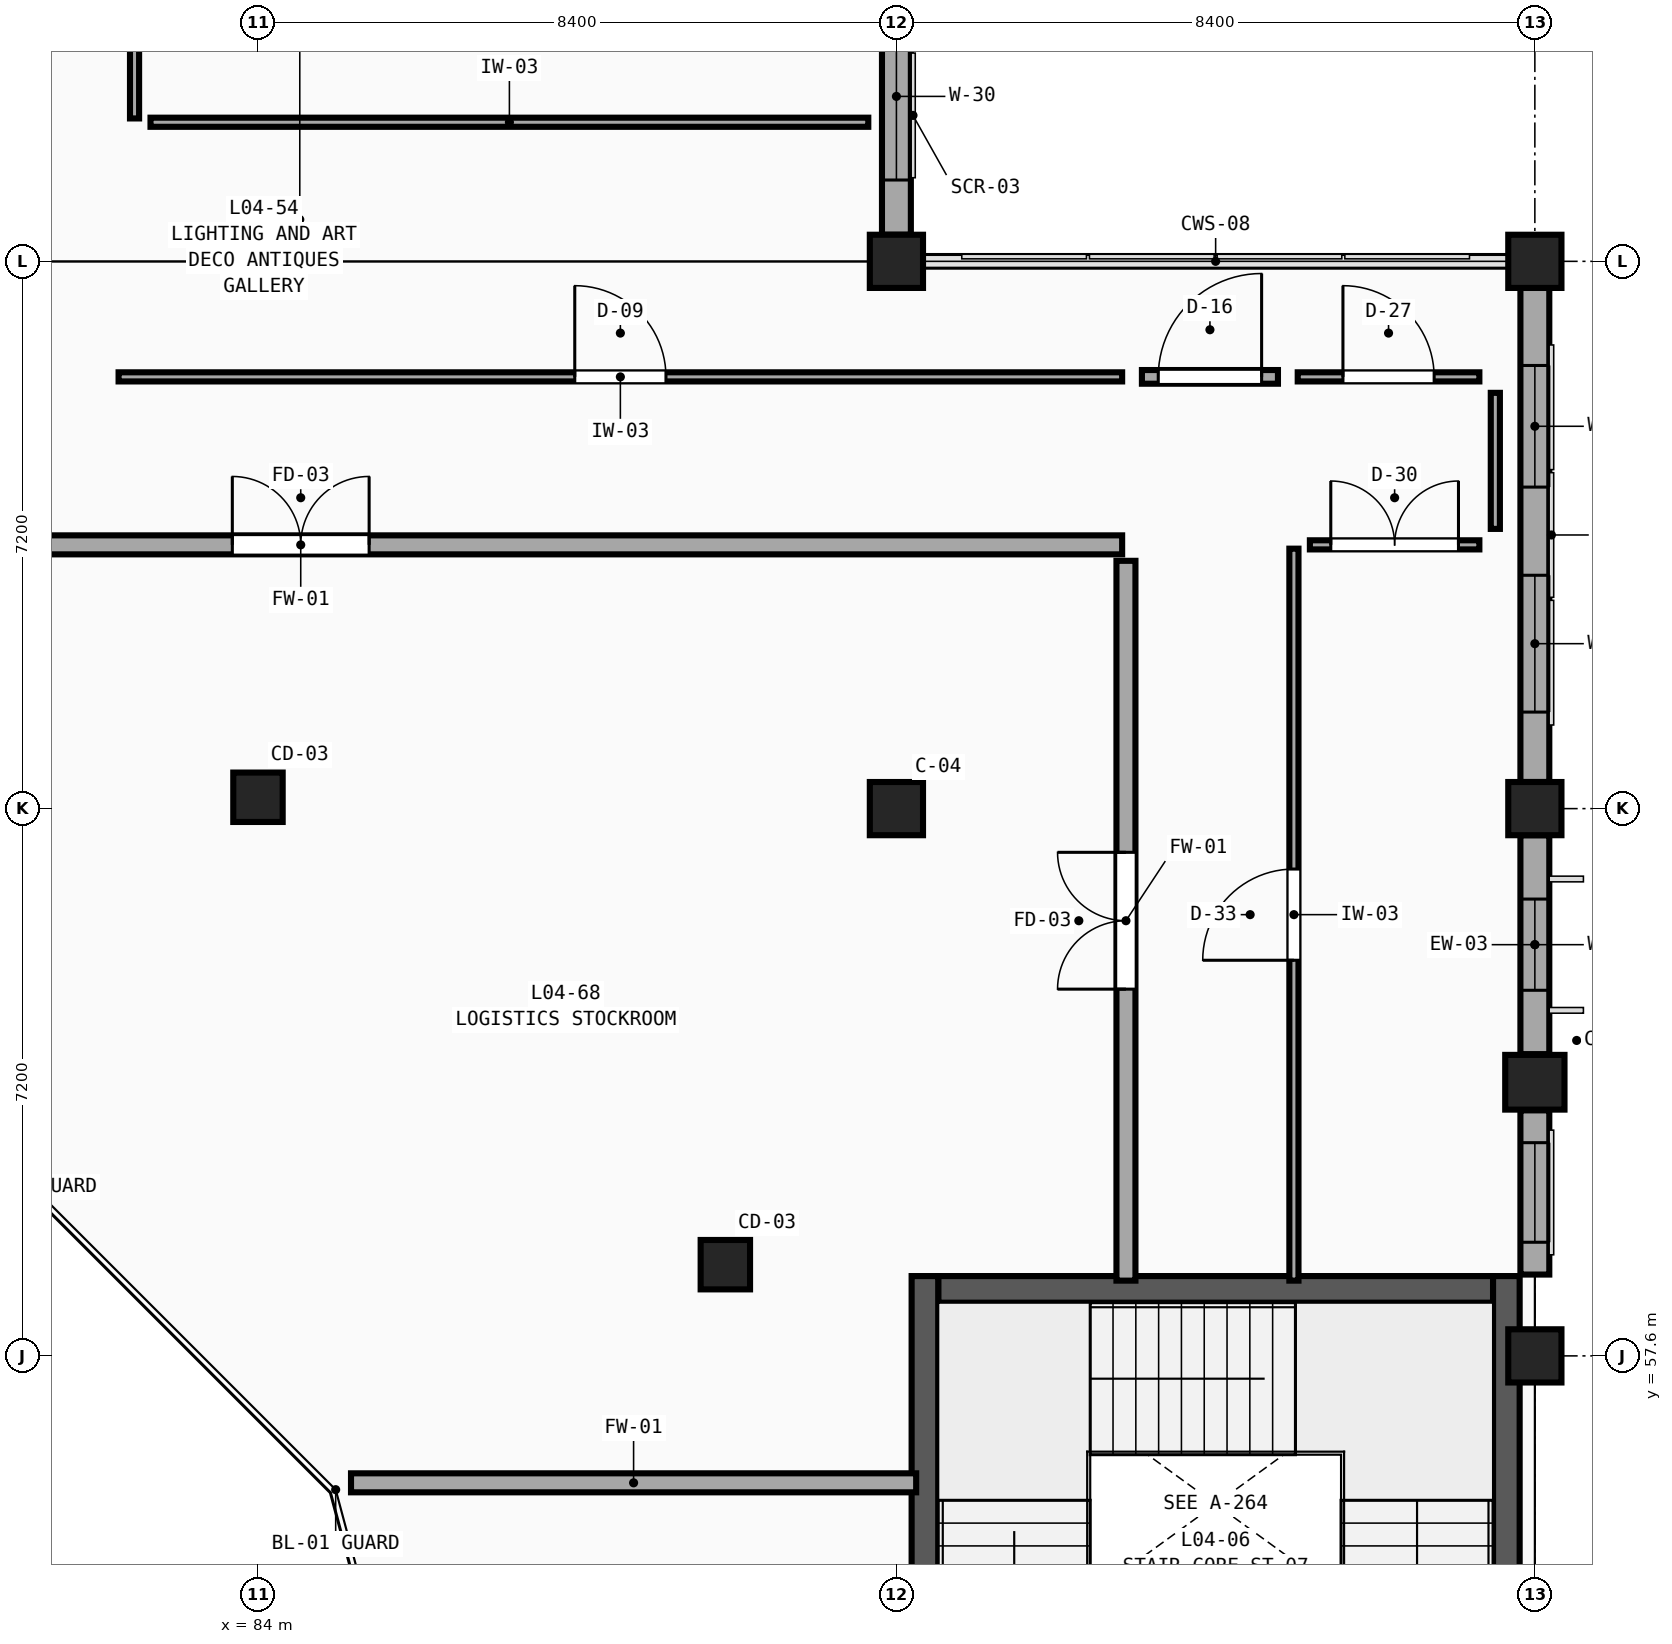
"""IFC4 building model, lengths in metres.
Left out: names, types, materials, properties, quantities, classifications, styles, units other than length and angle.
Written with IfcOpenShell. Run it as: python <this file> out.ifc"""

import sys

from ifc_helpers import new_model, si_unit, direction, frame, frame_2d, origin, origin_2d, place, context, subcontext, project, spatial, rectangle, circle, extrude, element, fill, save


model = new_model("IFC4")
c1 = context("Model", 3, precision=1e-05, world=origin(), true_north=direction((0.0, 1.0)))
c2 = subcontext(c1, "Body", "Model", "MODEL_VIEW")
j1 = project(units=[si_unit("LENGTHUNIT", "METRE"), si_unit("PLANEANGLEUNIT", "RADIAN")], contexts=[c1])
p1 = place(None, origin())
s1 = spatial("IfcSite", under=j1, at=p1, CompositionType="ELEMENT")
p2 = place(p1, origin())
s2 = spatial("IfcBuilding", under=s1, at=p2, CompositionType="ELEMENT")
p3 = place(p2, frame((0.0, 0.0, 18.9)))
s3 = spatial("IfcBuildingStorey", under=s2, at=p3, CompositionType="ELEMENT", Elevation=18.9)
for number, where, z_axis, x_axis in (
    (1, (84.0, 72.0, 0.0), (0.0, 0.0, 1.0), (1.0, 0.0, 0.0)),
    (2, (92.4, 64.8, 0.0), (0.0, 0.0, 1.0), (1.0, 0.0, 0.0)),
    (3, (92.4, 72.0, 0.0), (0.0, 0.0, 1.0), (1.0, 0.0, 0.0)),
    (4, (100.8, 57.6, 0.0), (0.0, 0.0, 1.0), (1.0, 0.0, 0.0)),
    (5, (100.8, 64.8, 0.0), (0.0, 0.0, 1.0), (1.0, 0.0, 0.0)),
    (6, (100.8, 72.0, 0.0), (0.0, 0.0, 1.0), (1.0, 0.0, 0.0)),
):
    element("IfcColumn", number, at=place(p3, frame(where, z_axis=z_axis, x_axis=x_axis)), inside=s3, PredefinedType="COLUMN", context=c2, shape_type="SweptSolid", body=[
        extrude(rectangle(XDim=0.7, YDim=0.7, at=origin_2d()), origin(), (0.0, 0.0, 1.0), 4.5),
    ])
p4 = place(p3, frame((100.8, 61.2, 0.0), z_axis=(0.0, 0.0, 1.0), x_axis=(1.0, 0.0, 0.0)))
e7 = element("IfcColumn", 7, at=p4, inside=s3, PredefinedType="PILASTER", context=c2, shape_type="SweptSolid", body=[
    extrude(rectangle(XDim=0.78, YDim=0.72, at=origin_2d()), origin(), (0.0, 0.0, 1.0), 4.5),
])
for number, where, z_axis, x_axis in (
    (8, (90.149, 58.8, 0.0), (0.0, 0.0, 1.0), (1.0, 0.0, 0.0)),
    (9, (84.0, 64.949, 0.0), (0.0, 0.0, 1.0), (1.0, 0.0, 0.0)),
):
    element("IfcColumn", number, at=place(p3, frame(where, z_axis=z_axis, x_axis=x_axis)), inside=s3, PredefinedType="COLUMN", context=c2, shape_type="SweptSolid", body=[
        extrude(circle(Radius=0.325, at=origin_2d()), origin(), (0.0, 0.0, 1.0), 4.5),
    ])
p5 = place(p3, frame((92.4, 78.85, 0.0), z_axis=(0.0, 0.0, 1.0), x_axis=(0.0, -1.0, 0.0)))
e10 = element("IfcWall", 10, at=p5, inside=s3, PredefinedType="SOLIDWALL", context=c2, shape_type="SweptSolid", body=[
    extrude(rectangle(XDim=6.5, YDim=0.38, at=frame_2d((3.25, 0.0))), origin(), (0.0, 0.0, 1.0), 3.63),
])
p6 = place(p5, frame((0.82, 0.0, 0.75)))
e11 = element("IfcOpeningElement", 11, at=p6, cuts=e10, PredefinedType="OPENING", context=c2, shape_type="SweptSolid", body=[
    extrude(rectangle(XDim=2.0, YDim=2.44, at=frame_2d((1.0, 1.22))), frame((0.0, 0.21, 0.0), z_axis=(0.0, -1.0, 0.0), x_axis=(1.0, 0.0, 0.0)), (0.0, 0.0, 1.0), 0.42),
])
p7 = place(p5, frame((3.58, 0.0, 0.75)))
e12 = element("IfcOpeningElement", 12, at=p7, cuts=e10, PredefinedType="OPENING", context=c2, shape_type="SweptSolid", body=[
    extrude(rectangle(XDim=2.2, YDim=2.44, at=frame_2d((1.1, 1.22))), frame((0.0, 0.21, 0.0), z_axis=(0.0, -1.0, 0.0), x_axis=(1.0, 0.0, 0.0)), (0.0, 0.0, 1.0), 0.42),
])
p8 = place(p3, frame((100.8, 64.45, 0.0), z_axis=(0.0, 0.0, 1.0), x_axis=(0.0, -1.0, 0.0)))
e13 = element("IfcWall", 13, at=p8, inside=s3, PredefinedType="SOLIDWALL", context=c2, shape_type="SweptSolid", body=[
    extrude(rectangle(XDim=2.88, YDim=0.38, at=frame_2d((1.44, 0.0))), origin(), (0.0, 0.0, 1.0), 3.63),
])
p9 = place(p8, frame((0.84, 0.0, 0.75)))
e14 = element("IfcOpeningElement", 14, at=p9, cuts=e13, PredefinedType="OPENING", context=c2, shape_type="SweptSolid", body=[
    extrude(rectangle(XDim=1.2, YDim=2.73, at=frame_2d((0.6, 1.365))), frame((0.0, 0.21, 0.0), z_axis=(0.0, -1.0, 0.0), x_axis=(1.0, 0.0, 0.0)), (0.0, 0.0, 1.0), 0.42),
])
p10 = place(p3, frame((100.8, 60.83, 0.0), z_axis=(0.0, 0.0, 1.0), x_axis=(0.0, -1.0, 0.0)))
e15 = element("IfcWall", 15, at=p10, inside=s3, PredefinedType="SOLIDWALL", context=c2, shape_type="SweptSolid", body=[
    extrude(rectangle(XDim=2.16, YDim=0.38, at=frame_2d((1.08, 0.0))), origin(), (0.0, 0.0, 1.0), 3.63),
])
p11 = place(p10, frame((0.425, 0.0, 0.75)))
e16 = element("IfcOpeningElement", 16, at=p11, cuts=e15, PredefinedType="OPENING", context=c2, shape_type="SweptSolid", body=[
    extrude(rectangle(XDim=1.31, YDim=2.73, at=frame_2d((0.655, 1.365))), frame((0.0, 0.21, 0.0), z_axis=(0.0, -1.0, 0.0), x_axis=(1.0, 0.0, 0.0)), (0.0, 0.0, 1.0), 0.42),
])
p12 = place(p3, frame((100.8, 71.65, 0.0), z_axis=(0.0, 0.0, 1.0), x_axis=(0.0, -1.0, 0.0)))
e17 = element("IfcWall", 17, at=p12, inside=s3, PredefinedType="SOLIDWALL", context=c2, shape_type="SweptSolid", body=[
    extrude(rectangle(XDim=6.5, YDim=0.38, at=frame_2d((3.25, 0.0))), origin(), (0.0, 0.0, 1.0), 3.63),
])
p13 = place(p12, frame((1.02, 0.0, 0.75)))
e18 = element("IfcOpeningElement", 18, at=p13, cuts=e17, PredefinedType="OPENING", context=c2, shape_type="SweptSolid", body=[
    extrude(rectangle(XDim=1.6, YDim=2.73, at=frame_2d((0.8, 1.365))), frame((0.0, 0.21, 0.0), z_axis=(0.0, -1.0, 0.0), x_axis=(1.0, 0.0, 0.0)), (0.0, 0.0, 1.0), 0.42),
])
p14 = place(p12, frame((3.78, 0.0, 0.75)))
e19 = element("IfcOpeningElement", 19, at=p14, cuts=e17, PredefinedType="OPENING", context=c2, shape_type="SweptSolid", body=[
    extrude(rectangle(XDim=1.8, YDim=2.73, at=frame_2d((0.9, 1.365))), frame((0.0, 0.21, 0.0), z_axis=(0.0, -1.0, 0.0), x_axis=(1.0, 0.0, 0.0)), (0.0, 0.0, 1.0), 0.42),
])
p15 = place(p3, frame((92.95, 58.475, 0.0), z_axis=(0.0, 0.0, 1.0), x_axis=(1.0, 0.0, 0.0)))
e20 = element("IfcWall", 20, at=p15, inside=s3, PredefinedType="SHEAR", context=c2, shape_type="SweptSolid", body=[
    extrude(rectangle(XDim=7.3, YDim=0.35, at=frame_2d((3.65, 0.0))), origin(), (0.0, 0.0, 1.0), 4.5),
])
for number, where, z_axis, x_axis in (
    (21, (92.775, 58.65, 0.0), (0.0, 0.0, 1.0), (0.0, -1.0, 0.0)),
    (22, (100.425, 50.5, 0.0), (0.0, 0.0, 1.0), (0.0, 1.0, 0.0)),
):
    element("IfcWall", number, at=place(p3, frame(where, z_axis=z_axis, x_axis=x_axis)), inside=s3, PredefinedType="SHEAR", context=c2, shape_type="SweptSolid", body=[
        extrude(rectangle(XDim=8.15, YDim=0.35, at=frame_2d((4.075, 0.0))), origin(), (0.0, 0.0, 1.0), 4.5),
    ])
p16 = place(p3, frame((73.755, 68.27, 0.0), z_axis=(0.0, 0.0, 1.0), x_axis=(1.0, 0.0, 0.0)))
e23 = element("IfcWall", 23, at=p16, inside=s3, PredefinedType="SOLIDWALL", context=c2, shape_type="SweptSolid", body=[
    extrude(rectangle(XDim=21.615, YDim=0.25, at=frame_2d((10.808, 0.0))), origin(), (0.0, 0.0, 1.0), 4.18),
])
p17 = place(p16, frame((9.907, 0.0, 0.0)))
e24 = element("IfcOpeningElement", 24, at=p17, cuts=e23, PredefinedType="OPENING", context=c2, shape_type="SweptSolid", body=[
    extrude(rectangle(XDim=1.8, YDim=2.3, at=frame_2d((0.9, 1.15))), frame((0.0, 0.145, 0.0), z_axis=(0.0, -1.0, 0.0), x_axis=(1.0, 0.0, 0.0)), (0.0, 0.0, 1.0), 0.29),
])
p18 = place(p3, frame((82.166, 70.48, 0.0), z_axis=(0.0, 0.0, 1.0), x_axis=(1.0, 0.0, 0.0)))
e25 = element("IfcWall", 25, at=p18, inside=s3, PredefinedType="PARTITIONING", context=c2, shape_type="SweptSolid", body=[
    extrude(rectangle(XDim=13.204, YDim=0.12, at=frame_2d((6.602, 0.0))), origin(), (0.0, 0.0, 1.0), 4.18),
])
p19 = place(p18, frame((6.002, 0.0, 0.0)))
e26 = element("IfcOpeningElement", 26, at=p19, cuts=e25, PredefinedType="OPENING", context=c2, shape_type="SweptSolid", body=[
    extrude(rectangle(XDim=1.2, YDim=2.13, at=frame_2d((0.6, 1.065))), frame((0.0, 0.08, 0.0), z_axis=(0.0, -1.0, 0.0), x_axis=(1.0, 0.0, 0.0)), (0.0, 0.0, 1.0), 0.16),
])
p20 = place(p3, frame((97.63, 58.59, 0.0), z_axis=(0.0, 0.0, 1.0), x_axis=(0.0, 1.0, 0.0)))
e27 = element("IfcWall", 27, at=p20, inside=s3, PredefinedType="PARTITIONING", context=c2, shape_type="SweptSolid", body=[
    extrude(rectangle(XDim=9.63, YDim=0.12, at=frame_2d((4.815, 0.0))), origin(), (0.0, 0.0, 1.0), 4.18),
])
p21 = place(p20, frame((4.215, 0.0, 0.0)))
e28 = element("IfcOpeningElement", 28, at=p21, cuts=e27, PredefinedType="OPENING", context=c2, shape_type="SweptSolid", body=[
    extrude(rectangle(XDim=1.2, YDim=2.45, at=frame_2d((0.6, 1.225))), frame((0.0, 0.08, 0.0), z_axis=(0.0, -1.0, 0.0), x_axis=(1.0, 0.0, 0.0)), (0.0, 0.0, 1.0), 0.16),
])
p22 = place(p3, frame((95.42, 58.59, 0.0), z_axis=(0.0, 0.0, 1.0), x_axis=(0.0, 1.0, 0.0)))
e29 = element("IfcWall", 29, at=p22, inside=s3, PredefinedType="SOLIDWALL", context=c2, shape_type="SweptSolid", body=[
    extrude(rectangle(XDim=9.47, YDim=0.25, at=frame_2d((4.735, 0.0))), origin(), (0.0, 0.0, 1.0), 4.18),
])
p23 = place(p22, frame((3.835, 0.0, 0.0)))
e30 = element("IfcOpeningElement", 30, at=p23, cuts=e29, PredefinedType="OPENING", context=c2, shape_type="SweptSolid", body=[
    extrude(rectangle(XDim=1.8, YDim=2.3, at=frame_2d((0.9, 1.15))), frame((0.0, 0.145, 0.0), z_axis=(0.0, -1.0, 0.0), x_axis=(1.0, 0.0, 0.0)), (0.0, 0.0, 1.0), 0.29),
])
p24 = place(p3, frame((97.68, 70.48, 0.0), z_axis=(0.0, 0.0, 1.0), x_axis=(1.0, 0.0, 0.0)))
e31 = element("IfcWall", 31, at=p24, inside=s3, PredefinedType="PARTITIONING", context=c2, shape_type="SweptSolid", body=[
    extrude(rectangle(XDim=2.39, YDim=0.12, at=frame_2d((1.195, 0.0))), origin(), (0.0, 0.0, 1.0), 4.18),
])
p25 = place(p24, frame((0.595, 0.0, 0.0)))
e32 = element("IfcOpeningElement", 32, at=p25, cuts=e31, PredefinedType="OPENING", context=c2, shape_type="SweptSolid", body=[
    extrude(rectangle(XDim=1.2, YDim=2.37, at=frame_2d((0.6, 1.185))), frame((0.0, 0.08, 0.0), z_axis=(0.0, -1.0, 0.0), x_axis=(1.0, 0.0, 0.0)), (0.0, 0.0, 1.0), 0.16),
])
p26 = place(p3, frame((97.84, 68.27, 0.0), z_axis=(0.0, 0.0, 1.0), x_axis=(1.0, 0.0, 0.0)))
e33 = element("IfcWall", 33, at=p26, inside=s3, PredefinedType="PARTITIONING", context=c2, shape_type="SweptSolid", body=[
    extrude(rectangle(XDim=2.23, YDim=0.12, at=frame_2d((1.115, 0.0))), origin(), (0.0, 0.0, 1.0), 4.18),
])
p27 = place(p26, frame((0.275, 0.0, 0.0)))
e34 = element("IfcOpeningElement", 34, at=p27, cuts=e33, PredefinedType="OPENING", context=c2, shape_type="SweptSolid", body=[
    extrude(rectangle(XDim=1.68, YDim=2.37, at=frame_2d((0.84, 1.185))), frame((0.0, 0.08, 0.0), z_axis=(0.0, -1.0, 0.0), x_axis=(1.0, 0.0, 0.0)), (0.0, 0.0, 1.0), 0.16),
])
p28 = place(p3, frame((100.28, 68.48, 0.0), z_axis=(0.0, 0.0, 1.0), x_axis=(0.0, 1.0, 0.0)))
e35 = element("IfcWall", 35, at=p28, inside=s3, PredefinedType="PARTITIONING", context=c2, shape_type="SweptSolid", body=[
    extrude(rectangle(XDim=1.79, YDim=0.12, at=frame_2d((0.895, 0.0))), origin(), (0.0, 0.0, 1.0), 3.63),
])
p29 = place(p3, frame((95.63, 70.48, 0.0), z_axis=(0.0, 0.0, 1.0), x_axis=(1.0, 0.0, 0.0)))
e36 = element("IfcWall", 36, at=p29, inside=s3, PredefinedType="PARTITIONING", context=c2, shape_type="SweptSolid", body=[
    extrude(rectangle(XDim=1.79, YDim=0.18, at=frame_2d((0.895, 0.0))), origin(), (0.0, 0.0, 1.0), 4.18),
])
p30 = place(p29, frame((0.215, 0.0, 0.0)))
e37 = element("IfcOpeningElement", 37, at=p30, cuts=e36, PredefinedType="OPENING", context=c2, shape_type="SweptSolid", body=[
    extrude(rectangle(XDim=1.36, YDim=2.21, at=frame_2d((0.68, 1.105))), frame((0.0, 0.11, 0.0), z_axis=(0.0, -1.0, 0.0), x_axis=(1.0, 0.0, 0.0)), (0.0, 0.0, 1.0), 0.22),
])
p31 = place(p3, frame((82.376, 73.88, 0.0), z_axis=(0.0, 0.0, 1.0), x_axis=(0.0, 1.0, 0.0)))
e38 = element("IfcWall", 38, at=p31, inside=s3, PredefinedType="PARTITIONING", context=c2, shape_type="SweptSolid", body=[
    extrude(rectangle(XDim=10.817, YDim=0.12, at=frame_2d((5.409, 0.0))), origin(), (0.0, 0.0, 1.0), 4.18),
])
p32 = place(p31, frame((2.375, 0.0, 0.0)))
e39 = element("IfcOpeningElement", 39, at=p32, cuts=e38, PredefinedType="OPENING", context=c2, shape_type="SweptSolid", body=[
    extrude(rectangle(XDim=1.68, YDim=2.29, at=frame_2d((0.84, 1.145))), frame((0.0, 0.08, 0.0), z_axis=(0.0, -1.0, 0.0), x_axis=(1.0, 0.0, 0.0)), (0.0, 0.0, 1.0), 0.16),
])
p33 = place(p3, frame((82.586, 73.83, 0.0), z_axis=(0.0, 0.0, 1.0), x_axis=(1.0, 0.0, 0.0)))
e40 = element("IfcWall", 40, at=p33, inside=s3, PredefinedType="PARTITIONING", context=c2, shape_type="SweptSolid", body=[
    extrude(rectangle(XDim=9.444, YDim=0.12, at=frame_2d((4.722, 0.0))), origin(), (0.0, 0.0, 1.0), 4.18),
])
p34 = place(p3, frame((85.224, 55.93, 0.0), z_axis=(0.0, 0.0, 1.0), x_axis=(1.0, 0.0, 0.0)))
e41 = element("IfcWall", 41, at=p34, inside=s3, PredefinedType="SOLIDWALL", context=c2, shape_type="SweptSolid", body=[
    extrude(rectangle(XDim=7.436, YDim=0.25, at=frame_2d((3.718, 0.0))), origin(), (0.0, 0.0, 1.0), 4.18),
])
p35 = place(p7, origin())
e42 = element("IfcWindow", 42, at=p35, inside=s3, PartitioningType="TRIPLE_PANEL_VERTICAL", PredefinedType="WINDOW", context=c2, shape_type="SweptSolid", body=[
    extrude(rectangle(XDim=2.2, YDim=2.44, at=frame_2d((1.1, 1.22))), frame((0.0, 0.03, 0.0), z_axis=(0.0, -1.0, 0.0), x_axis=(1.0, 0.0, 0.0)), (0.0, 0.0, 1.0), 0.06),
])
fill(e12, e42)
p36 = place(p9, origin())
e43 = element("IfcWindow", 43, at=p36, inside=s3, PartitioningType="SINGLE_PANEL", PredefinedType="WINDOW", context=c2, shape_type="SweptSolid", body=[
    extrude(rectangle(XDim=1.2, YDim=2.73, at=frame_2d((0.6, 1.365))), frame((0.0, 0.03, 0.0), z_axis=(0.0, -1.0, 0.0), x_axis=(1.0, 0.0, 0.0)), (0.0, 0.0, 1.0), 0.06),
])
fill(e14, e43)
p37 = place(p11, origin())
e44 = element("IfcWindow", 44, at=p37, inside=s3, PartitioningType="DOUBLE_PANEL_VERTICAL", PredefinedType="WINDOW", context=c2, shape_type="SweptSolid", body=[
    extrude(rectangle(XDim=1.31, YDim=2.73, at=frame_2d((0.655, 1.365))), frame((0.0, 0.03, 0.0), z_axis=(0.0, -1.0, 0.0), x_axis=(1.0, 0.0, 0.0)), (0.0, 0.0, 1.0), 0.06),
])
fill(e16, e44)
p38 = place(p13, origin())
e45 = element("IfcWindow", 45, at=p38, inside=s3, PartitioningType="DOUBLE_PANEL_VERTICAL", PredefinedType="WINDOW", context=c2, shape_type="SweptSolid", body=[
    extrude(rectangle(XDim=1.6, YDim=2.73, at=frame_2d((0.8, 1.365))), frame((0.0, 0.03, 0.0), z_axis=(0.0, -1.0, 0.0), x_axis=(1.0, 0.0, 0.0)), (0.0, 0.0, 1.0), 0.06),
])
fill(e18, e45)
p39 = place(p14, origin())
e46 = element("IfcWindow", 46, at=p39, inside=s3, PartitioningType="DOUBLE_PANEL_VERTICAL", PredefinedType="WINDOW", context=c2, shape_type="SweptSolid", body=[
    extrude(rectangle(XDim=1.8, YDim=2.73, at=frame_2d((0.9, 1.365))), frame((0.0, 0.03, 0.0), z_axis=(0.0, -1.0, 0.0), x_axis=(1.0, 0.0, 0.0)), (0.0, 0.0, 1.0), 0.06),
])
fill(e19, e46)
p40 = place(p17, origin())
e47 = element("IfcDoor", 47, at=p40, inside=s3, OperationType="DOUBLE_DOOR_SINGLE_SWING", PredefinedType="DOOR", context=c2, shape_type="SweptSolid", body=[
    extrude(rectangle(XDim=1.8, YDim=2.3, at=frame_2d((0.9, 1.15))), frame((0.0, 0.025, 0.0), z_axis=(0.0, -1.0, 0.0), x_axis=(1.0, 0.0, 0.0)), (0.0, 0.0, 1.0), 0.05),
])
fill(e24, e47)
p41 = place(p19, origin())
e48 = element("IfcDoor", 48, at=p41, inside=s3, OperationType="SINGLE_SWING_LEFT", PredefinedType="DOOR", context=c2, shape_type="SweptSolid", body=[
    extrude(rectangle(XDim=1.2, YDim=2.13, at=frame_2d((0.6, 1.065))), frame((0.0, 0.025, 0.0), z_axis=(0.0, -1.0, 0.0), x_axis=(1.0, 0.0, 0.0)), (0.0, 0.0, 1.0), 0.05),
])
fill(e26, e48)
p42 = place(p21, origin())
e49 = element("IfcDoor", 49, at=p42, inside=s3, OperationType="SINGLE_SWING_LEFT", PredefinedType="DOOR", context=c2, shape_type="SweptSolid", body=[
    extrude(rectangle(XDim=1.2, YDim=2.45, at=frame_2d((0.6, 1.225))), frame((0.0, 0.025, 0.0), z_axis=(0.0, -1.0, 0.0), x_axis=(1.0, 0.0, 0.0)), (0.0, 0.0, 1.0), 0.05),
])
fill(e28, e49)
p43 = place(p23, origin())
e50 = element("IfcDoor", 50, at=p43, inside=s3, OperationType="DOUBLE_DOOR_SINGLE_SWING", PredefinedType="DOOR", context=c2, shape_type="SweptSolid", body=[
    extrude(rectangle(XDim=1.8, YDim=2.3, at=frame_2d((0.9, 1.15))), frame((0.0, 0.025, 0.0), z_axis=(0.0, -1.0, 0.0), x_axis=(1.0, 0.0, 0.0)), (0.0, 0.0, 1.0), 0.05),
])
fill(e30, e50)
p44 = place(p25, origin())
e51 = element("IfcDoor", 51, at=p44, inside=s3, OperationType="SINGLE_SWING_LEFT", PredefinedType="DOOR", context=c2, shape_type="SweptSolid", body=[
    extrude(rectangle(XDim=1.2, YDim=2.37, at=frame_2d((0.6, 1.185))), frame((0.0, 0.025, 0.0), z_axis=(0.0, -1.0, 0.0), x_axis=(1.0, 0.0, 0.0)), (0.0, 0.0, 1.0), 0.05),
])
fill(e32, e51)
p45 = place(p27, origin())
e52 = element("IfcDoor", 52, at=p45, inside=s3, OperationType="DOUBLE_DOOR_SINGLE_SWING", PredefinedType="DOOR", context=c2, shape_type="SweptSolid", body=[
    extrude(rectangle(XDim=1.68, YDim=2.37, at=frame_2d((0.84, 1.185))), frame((0.0, 0.025, 0.0), z_axis=(0.0, -1.0, 0.0), x_axis=(1.0, 0.0, 0.0)), (0.0, 0.0, 1.0), 0.05),
])
fill(e34, e52)
p46 = place(p30, origin())
e53 = element("IfcDoor", 53, at=p46, inside=s3, OperationType="SINGLE_SWING_RIGHT", PredefinedType="DOOR", context=c2, shape_type="SweptSolid", body=[
    extrude(rectangle(XDim=1.36, YDim=2.21, at=frame_2d((0.68, 1.105))), frame((0.0, 0.025, 0.0), z_axis=(0.0, -1.0, 0.0), x_axis=(1.0, 0.0, 0.0)), (0.0, 0.0, 1.0), 0.05),
])
fill(e37, e53)
save(model, sys.argv[1])
